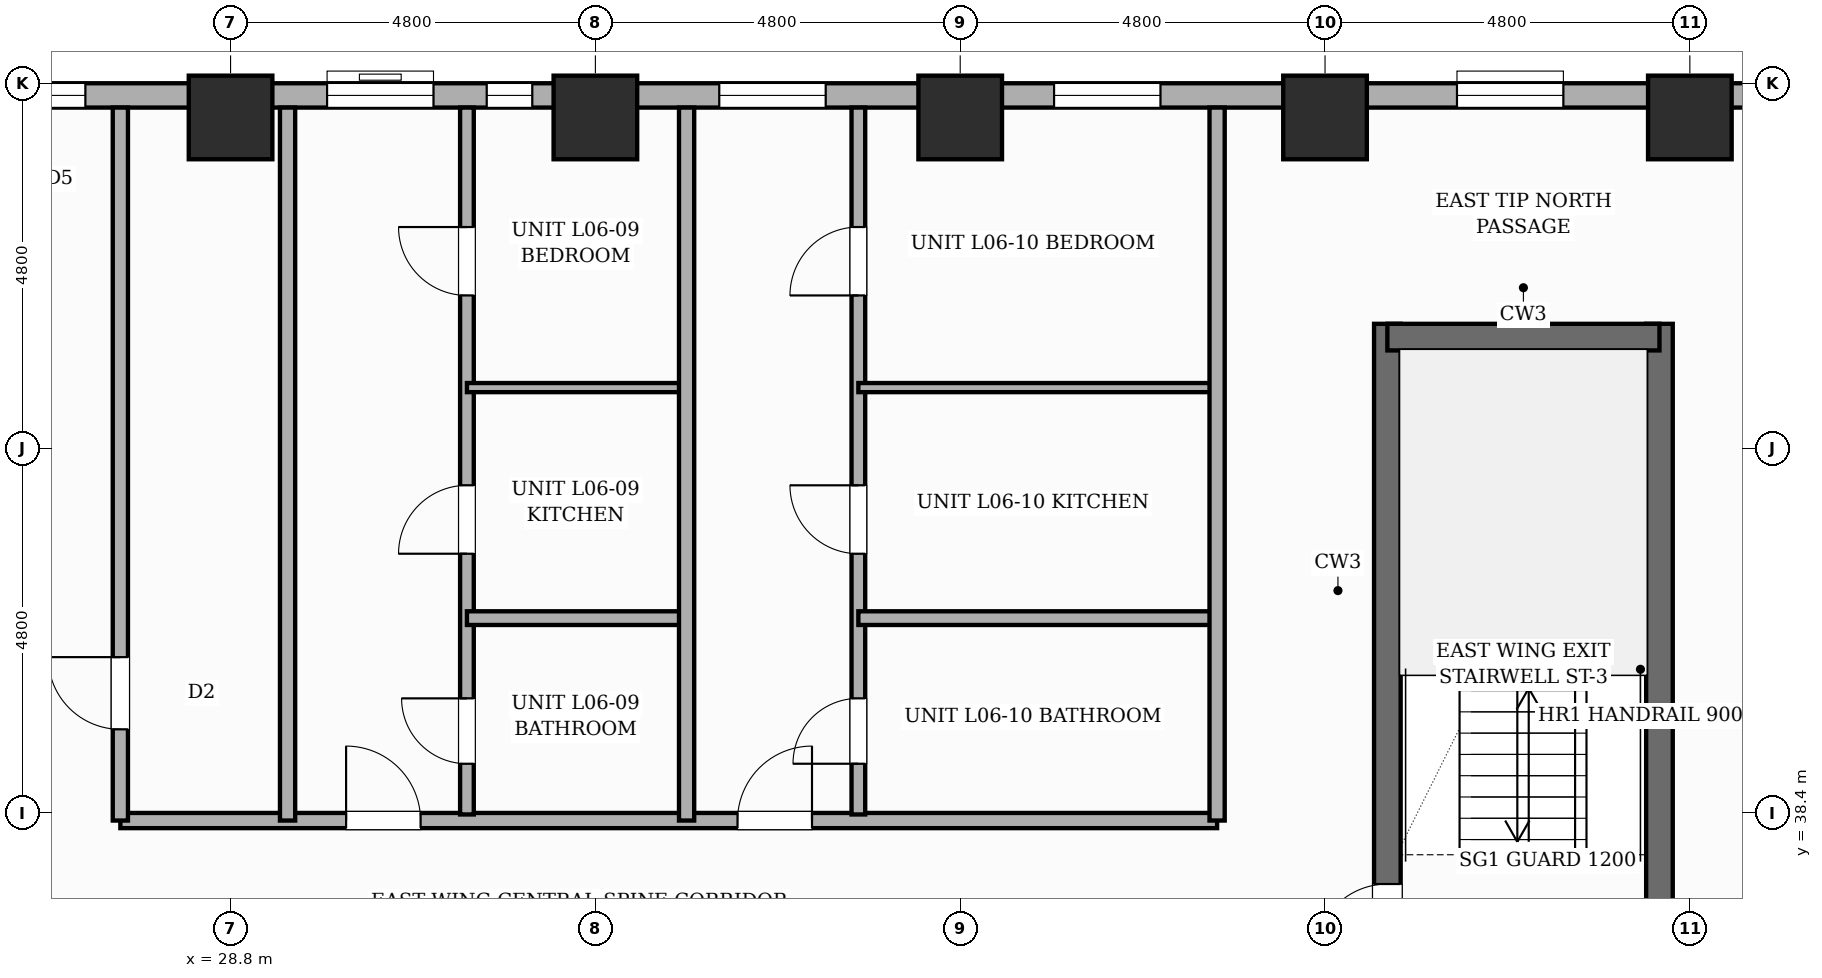
"""IFC4 building model, lengths in metres.
Left out: names, types, materials, properties, quantities, classifications, styles, units other than length and angle.
Written with IfcOpenShell. Run it as: python <this file> out.ifc"""

import sys

from ifc_helpers import new_model, si_unit, direction, frame, frame_2d, origin, origin_2d, place, context, subcontext, project, spatial, rectangle, extrude, element, fill, save


model = new_model("IFC4")
c1 = context("Model", 3, precision=1e-05, world=origin(), true_north=direction((0.0, 1.0)))
c2 = subcontext(c1, "Body", "Model", "MODEL_VIEW")
j1 = project(units=[si_unit("LENGTHUNIT", "METRE"), si_unit("PLANEANGLEUNIT", "RADIAN")], contexts=[c1])
p1 = place(None, origin())
s1 = spatial("IfcSite", under=j1, at=p1, CompositionType="ELEMENT")
p2 = place(p1, origin())
s2 = spatial("IfcBuilding", under=s1, at=p2, CompositionType="ELEMENT")
p3 = place(p2, frame((0.0, 0.0, 28.6)))
s3 = spatial("IfcBuildingStorey", under=s2, at=p3, CompositionType="ELEMENT", Elevation=28.6)
p4 = place(p3, frame((44.02, 35.865, 0.0), z_axis=(0.0, 0.0, 1.0), x_axis=(0.0, 1.0, 0.0)))
e1 = element("IfcWall", 1, at=p4, inside=s3, PredefinedType="SHEAR", context=c2, shape_type="SweptSolid", body=[
    extrude(rectangle(XDim=8.97, YDim=0.35, at=frame_2d((4.485, 0.0))), origin(), (0.0, 0.0, 1.0), 3.6),
])
p5 = place(p4, frame((0.65, 0.0, 0.0)))
e2 = element("IfcOpeningElement", 2, at=p5, cuts=e1, PredefinedType="OPENING", context=c2, shape_type="SweptSolid", body=[
    extrude(rectangle(XDim=0.95, YDim=2.1, at=frame_2d((0.475, 1.05))), frame((0.0, 0.185, 0.0), z_axis=(0.0, -1.0, 0.0), x_axis=(1.0, 0.0, 0.0)), (0.0, 0.0, 1.0), 0.37),
])
p6 = place(p3, frame((47.6, 35.865, 0.0), z_axis=(0.0, 0.0, 1.0), x_axis=(0.0, 1.0, 0.0)))
e3 = element("IfcWall", 3, at=p6, inside=s3, PredefinedType="SHEAR", context=c2, shape_type="SweptSolid", body=[
    extrude(rectangle(XDim=8.97, YDim=0.35, at=frame_2d((4.485, 0.0))), origin(), (0.0, 0.0, 1.0), 3.6),
])
p7 = place(p3, frame((44.02, 44.66, 0.0), z_axis=(0.0, 0.0, 1.0), x_axis=(1.0, 0.0, 0.0)))
e4 = element("IfcWall", 4, at=p7, inside=s3, PredefinedType="SHEAR", context=c2, shape_type="SweptSolid", body=[
    extrude(rectangle(XDim=3.58, YDim=0.35, at=frame_2d((1.79, 0.0))), origin(), (0.0, 0.0, 1.0), 3.6),
])
for number, where, z_axis, x_axis in (
    (5, (28.8, 47.55, 0.0), (0.0, 0.0, 1.0), (1.0, 0.0, 0.0)),
    (6, (33.6, 47.55, 0.0), (0.0, 0.0, 1.0), (1.0, 0.0, 0.0)),
    (7, (38.4, 47.55, 0.0), (0.0, 0.0, 1.0), (1.0, 0.0, 0.0)),
    (8, (43.2, 47.55, 0.0), (0.0, 0.0, 1.0), (1.0, 0.0, 0.0)),
    (9, (48.0, 47.55, 0.0), (0.0, 0.0, 1.0), (1.0, 0.0, 0.0)),
):
    element("IfcColumn", number, at=place(p3, frame(where, z_axis=z_axis, x_axis=x_axis)), inside=s3, PredefinedType="COLUMN", context=c2, shape_type="SweptSolid", body=[
        extrude(rectangle(XDim=1.1, YDim=1.1, at=origin_2d()), origin(), (0.0, 0.0, 1.0), 3.6),
    ])
p8 = place(p3, frame((7.2, 47.84, 0.0), z_axis=(0.0, 0.0, 1.0), x_axis=(1.0, 0.0, 0.0)))
e10 = element("IfcWall", 10, at=p8, inside=s3, PredefinedType="STANDARD", context=c2, shape_type="SweptSolid", body=[
    extrude(rectangle(XDim=48.0, YDim=0.32, at=frame_2d((24.0, 0.0))), origin(), (0.0, 0.0, 1.0), 2.53),
])
p9 = place(p8, frame((24.97, 0.0, 0.45)))
e11 = element("IfcOpeningElement", 11, at=p9, cuts=e10, PredefinedType="OPENING", context=c2, shape_type="SweptSolid", body=[
    extrude(rectangle(XDim=0.6, YDim=1.8, at=frame_2d((0.3, 0.9))), frame((0.0, 0.17, 0.0), z_axis=(0.0, -1.0, 0.0), x_axis=(1.0, 0.0, 0.0)), (0.0, 0.0, 1.0), 0.34),
])
p10 = place(p8, frame((32.435, 0.0, 0.65)))
e12 = element("IfcOpeningElement", 12, at=p10, cuts=e10, PredefinedType="OPENING", context=c2, shape_type="SweptSolid", body=[
    extrude(rectangle(XDim=1.4, YDim=1.1, at=frame_2d((0.7, 0.55))), frame((0.0, 0.17, 0.0), z_axis=(0.0, -1.0, 0.0), x_axis=(1.0, 0.0, 0.0)), (0.0, 0.0, 1.0), 0.34),
])
p11 = place(p8, frame((47.094, 0.0, 0.45)))
e13 = element("IfcOpeningElement", 13, at=p11, cuts=e10, PredefinedType="OPENING", context=c2, shape_type="SweptSolid", body=[
    extrude(rectangle(XDim=0.6, YDim=1.8, at=frame_2d((0.3, 0.9))), frame((0.0, 0.17, 0.0), z_axis=(0.0, -1.0, 0.0), x_axis=(1.0, 0.0, 0.0)), (0.0, 0.0, 1.0), 0.34),
])
p12 = place(p8, frame((18.74, 0.0, 0.45)))
e14 = element("IfcOpeningElement", 14, at=p12, cuts=e10, PredefinedType="OPENING", context=c2, shape_type="SweptSolid", body=[
    extrude(rectangle(XDim=0.95, YDim=1.8, at=frame_2d((0.475, 0.9))), frame((0.0, 0.17, 0.0), z_axis=(0.0, -1.0, 0.0), x_axis=(1.0, 0.0, 0.0)), (0.0, 0.0, 1.0), 0.34),
])
p13 = place(p8, frame((41.65, 0.0, 0.45)))
e15 = element("IfcOpeningElement", 15, at=p13, cuts=e10, PredefinedType="OPENING", context=c2, shape_type="SweptSolid", body=[
    extrude(rectangle(XDim=0.75, YDim=1.8, at=frame_2d((0.375, 0.9))), frame((0.0, 0.17, 0.0), z_axis=(0.0, -1.0, 0.0), x_axis=(1.0, 0.0, 0.0)), (0.0, 0.0, 1.0), 0.34),
])
p14 = place(p8, frame((37.736, 0.0, 0.65)))
e16 = element("IfcOpeningElement", 16, at=p14, cuts=e10, PredefinedType="OPENING", context=c2, shape_type="SweptSolid", body=[
    extrude(rectangle(XDim=1.4, YDim=1.1, at=frame_2d((0.7, 0.55))), frame((0.0, 0.17, 0.0), z_axis=(0.0, -1.0, 0.0), x_axis=(1.0, 0.0, 0.0)), (0.0, 0.0, 1.0), 0.34),
])
p15 = place(p8, frame((0.47, 0.0, 0.45)))
e17 = element("IfcOpeningElement", 17, at=p15, cuts=e10, PredefinedType="OPENING", context=c2, shape_type="SweptSolid", body=[
    extrude(rectangle(XDim=0.95, YDim=1.8, at=frame_2d((0.475, 0.9))), frame((0.0, 0.17, 0.0), z_axis=(0.0, -1.0, 0.0), x_axis=(1.0, 0.0, 0.0)), (0.0, 0.0, 1.0), 0.34),
])
p16 = place(p8, frame((4.815, 0.0, 0.65)))
e18 = element("IfcOpeningElement", 18, at=p16, cuts=e10, PredefinedType="OPENING", context=c2, shape_type="SweptSolid", body=[
    extrude(rectangle(XDim=1.4, YDim=1.1, at=frame_2d((0.7, 0.55))), frame((0.0, 0.17, 0.0), z_axis=(0.0, -1.0, 0.0), x_axis=(1.0, 0.0, 0.0)), (0.0, 0.0, 1.0), 0.34),
])
p17 = place(p8, frame((22.87, 0.0, 0.65)))
e19 = element("IfcOpeningElement", 19, at=p17, cuts=e10, PredefinedType="OPENING", context=c2, shape_type="SweptSolid", body=[
    extrude(rectangle(XDim=1.4, YDim=1.1, at=frame_2d((0.7, 0.55))), frame((0.0, 0.17, 0.0), z_axis=(0.0, -1.0, 0.0), x_axis=(1.0, 0.0, 0.0)), (0.0, 0.0, 1.0), 0.34),
])
p18 = place(p8, frame((28.03, 0.0, 0.65)))
e20 = element("IfcOpeningElement", 20, at=p18, cuts=e10, PredefinedType="OPENING", context=c2, shape_type="SweptSolid", body=[
    extrude(rectangle(XDim=1.4, YDim=1.1, at=frame_2d((0.7, 0.55))), frame((0.0, 0.17, 0.0), z_axis=(0.0, -1.0, 0.0), x_axis=(1.0, 0.0, 0.0)), (0.0, 0.0, 1.0), 0.34),
])
p19 = place(p8, frame((42.95, 0.0, 0.65)))
e21 = element("IfcOpeningElement", 21, at=p19, cuts=e10, PredefinedType="OPENING", context=c2, shape_type="SweptSolid", body=[
    extrude(rectangle(XDim=1.4, YDim=1.1, at=frame_2d((0.7, 0.55))), frame((0.0, 0.17, 0.0), z_axis=(0.0, -1.0, 0.0), x_axis=(1.0, 0.0, 0.0)), (0.0, 0.0, 1.0), 0.34),
])
p20 = place(p8, frame((45.984, 0.0, 0.45)))
e22 = element("IfcOpeningElement", 22, at=p20, cuts=e10, PredefinedType="OPENING", context=c2, shape_type="SweptSolid", body=[
    extrude(rectangle(XDim=0.6, YDim=1.8, at=frame_2d((0.3, 0.9))), frame((0.0, 0.17, 0.0), z_axis=(0.0, -1.0, 0.0), x_axis=(1.0, 0.0, 0.0)), (0.0, 0.0, 1.0), 0.34),
])
p21 = place(p3, frame((27.35, 38.3, 0.0), z_axis=(0.0, 0.0, 1.0), x_axis=(1.0, 0.0, 0.0)))
e23 = element("IfcWall", 23, at=p21, inside=s3, PredefinedType="PARTITIONING", context=c2, shape_type="SweptSolid", body=[
    extrude(rectangle(XDim=14.43, YDim=0.2, at=frame_2d((7.215, 0.0))), origin(), (0.0, 0.0, 1.0), 3.35),
])
p22 = place(p21, frame((2.97, 0.0, 0.0)))
e24 = element("IfcOpeningElement", 24, at=p22, cuts=e23, PredefinedType="OPENING", context=c2, shape_type="SweptSolid", body=[
    extrude(rectangle(XDim=0.98, YDim=2.18, at=frame_2d((0.49, 1.09))), frame((0.0, 0.11, 0.0), z_axis=(0.0, -1.0, 0.0), x_axis=(1.0, 0.0, 0.0)), (0.0, 0.0, 1.0), 0.22),
])
p23 = place(p21, frame((8.12, 0.0, 0.0)))
e25 = element("IfcOpeningElement", 25, at=p23, cuts=e23, PredefinedType="OPENING", context=c2, shape_type="SweptSolid", body=[
    extrude(rectangle(XDim=0.98, YDim=2.18, at=frame_2d((0.49, 1.09))), frame((0.0, 0.11, 0.0), z_axis=(0.0, -1.0, 0.0), x_axis=(1.0, 0.0, 0.0)), (0.0, 0.0, 1.0), 0.22),
])
p24 = place(p3, frame((27.35, 38.3, 0.0), z_axis=(0.0, 0.0, 1.0), x_axis=(0.0, 1.0, 0.0)))
e26 = element("IfcWall", 26, at=p24, inside=s3, PredefinedType="PARTITIONING", context=c2, shape_type="SweptSolid", body=[
    extrude(rectangle(XDim=9.38, YDim=0.2, at=frame_2d((4.69, 0.0))), origin(), (0.0, 0.0, 1.0), 3.35),
])
p25 = place(p24, frame((1.2, 0.0, 0.0)))
e27 = element("IfcOpeningElement", 27, at=p25, cuts=e26, PredefinedType="OPENING", context=c2, shape_type="SweptSolid", body=[
    extrude(rectangle(XDim=0.95, YDim=2.15, at=frame_2d((0.475, 1.075))), frame((0.0, 0.11, 0.0), z_axis=(0.0, -1.0, 0.0), x_axis=(1.0, 0.0, 0.0)), (0.0, 0.0, 1.0), 0.22),
])
p26 = place(p3, frame((29.55, 38.3, 0.0), z_axis=(0.0, 0.0, 1.0), x_axis=(0.0, 1.0, 0.0)))
e28 = element("IfcWall", 28, at=p26, inside=s3, PredefinedType="SOLIDWALL", context=c2, shape_type="SweptSolid", body=[
    extrude(rectangle(XDim=9.38, YDim=0.2, at=frame_2d((4.69, 0.0))), origin(), (0.0, 0.0, 1.0), 3.35),
])
p27 = place(p3, frame((31.91, 38.38, 0.0), z_axis=(0.0, 0.0, 1.0), x_axis=(0.0, 1.0, 0.0)))
e29 = element("IfcWall", 29, at=p27, inside=s3, PredefinedType="PLUMBINGWALL", context=c2, shape_type="SweptSolid", body=[
    extrude(rectangle(XDim=9.3, YDim=0.18, at=frame_2d((4.65, 0.0))), origin(), (0.0, 0.0, 1.0), 3.35),
])
p28 = place(p27, frame((0.667, 0.0, 0.0)))
e30 = element("IfcOpeningElement", 30, at=p28, cuts=e29, PredefinedType="OPENING", context=c2, shape_type="SweptSolid", body=[
    extrude(rectangle(XDim=0.86, YDim=2.1, at=frame_2d((0.43, 1.05))), frame((0.0, 0.1, 0.0), z_axis=(0.0, -1.0, 0.0), x_axis=(1.0, 0.0, 0.0)), (0.0, 0.0, 1.0), 0.2),
])
p29 = place(p27, frame((3.43, 0.0, 0.0)))
e31 = element("IfcOpeningElement", 31, at=p29, cuts=e29, PredefinedType="OPENING", context=c2, shape_type="SweptSolid", body=[
    extrude(rectangle(XDim=0.9, YDim=2.15, at=frame_2d((0.45, 1.075))), frame((0.0, 0.1, 0.0), z_axis=(0.0, -1.0, 0.0), x_axis=(1.0, 0.0, 0.0)), (0.0, 0.0, 1.0), 0.2),
])
p30 = place(p27, frame((6.828, 0.0, 0.0)))
e32 = element("IfcOpeningElement", 32, at=p30, cuts=e29, PredefinedType="OPENING", context=c2, shape_type="SweptSolid", body=[
    extrude(rectangle(XDim=0.9, YDim=2.15, at=frame_2d((0.45, 1.075))), frame((0.0, 0.1, 0.0), z_axis=(0.0, -1.0, 0.0), x_axis=(1.0, 0.0, 0.0)), (0.0, 0.0, 1.0), 0.2),
])
p31 = place(p3, frame((31.91, 40.963, 0.0), z_axis=(0.0, 0.0, 1.0), x_axis=(1.0, 0.0, 0.0)))
e33 = element("IfcWall", 33, at=p31, inside=s3, PredefinedType="PLUMBINGWALL", context=c2, shape_type="SweptSolid", body=[
    extrude(rectangle(XDim=2.91, YDim=0.18, at=frame_2d((1.455, 0.0))), origin(), (0.0, 0.0, 1.0), 3.35),
])
p32 = place(p3, frame((31.91, 43.996, 0.0), z_axis=(0.0, 0.0, 1.0), x_axis=(1.0, 0.0, 0.0)))
e34 = element("IfcWall", 34, at=p32, inside=s3, PredefinedType="PARTITIONING", context=c2, shape_type="SweptSolid", body=[
    extrude(rectangle(XDim=2.91, YDim=0.12, at=frame_2d((1.455, 0.0))), origin(), (0.0, 0.0, 1.0), 3.35),
])
p33 = place(p3, frame((34.8, 38.3, 0.0), z_axis=(0.0, 0.0, 1.0), x_axis=(0.0, 1.0, 0.0)))
e35 = element("IfcWall", 35, at=p33, inside=s3, PredefinedType="SOLIDWALL", context=c2, shape_type="SweptSolid", body=[
    extrude(rectangle(XDim=9.38, YDim=0.2, at=frame_2d((4.69, 0.0))), origin(), (0.0, 0.0, 1.0), 3.35),
])
p34 = place(p3, frame((37.06, 38.38, 0.0), z_axis=(0.0, 0.0, 1.0), x_axis=(0.0, 1.0, 0.0)))
e36 = element("IfcWall", 36, at=p34, inside=s3, PredefinedType="PLUMBINGWALL", context=c2, shape_type="SweptSolid", body=[
    extrude(rectangle(XDim=9.3, YDim=0.18, at=frame_2d((4.65, 0.0))), origin(), (0.0, 0.0, 1.0), 3.35),
])
p35 = place(p34, frame((0.667, 0.0, 0.0)))
e37 = element("IfcOpeningElement", 37, at=p35, cuts=e36, PredefinedType="OPENING", context=c2, shape_type="SweptSolid", body=[
    extrude(rectangle(XDim=0.86, YDim=2.1, at=frame_2d((0.43, 1.05))), frame((0.0, 0.1, 0.0), z_axis=(0.0, -1.0, 0.0), x_axis=(1.0, 0.0, 0.0)), (0.0, 0.0, 1.0), 0.2),
])
p36 = place(p34, frame((3.43, 0.0, 0.0)))
e38 = element("IfcOpeningElement", 38, at=p36, cuts=e36, PredefinedType="OPENING", context=c2, shape_type="SweptSolid", body=[
    extrude(rectangle(XDim=0.9, YDim=2.15, at=frame_2d((0.45, 1.075))), frame((0.0, 0.1, 0.0), z_axis=(0.0, -1.0, 0.0), x_axis=(1.0, 0.0, 0.0)), (0.0, 0.0, 1.0), 0.2),
])
p37 = place(p34, frame((6.828, 0.0, 0.0)))
e39 = element("IfcOpeningElement", 39, at=p37, cuts=e36, PredefinedType="OPENING", context=c2, shape_type="SweptSolid", body=[
    extrude(rectangle(XDim=0.9, YDim=2.15, at=frame_2d((0.45, 1.075))), frame((0.0, 0.1, 0.0), z_axis=(0.0, -1.0, 0.0), x_axis=(1.0, 0.0, 0.0)), (0.0, 0.0, 1.0), 0.2),
])
p38 = place(p3, frame((37.06, 40.963, 0.0), z_axis=(0.0, 0.0, 1.0), x_axis=(1.0, 0.0, 0.0)))
e40 = element("IfcWall", 40, at=p38, inside=s3, PredefinedType="PLUMBINGWALL", context=c2, shape_type="SweptSolid", body=[
    extrude(rectangle(XDim=4.64, YDim=0.18, at=frame_2d((2.32, 0.0))), origin(), (0.0, 0.0, 1.0), 3.35),
])
p39 = place(p3, frame((37.06, 43.996, 0.0), z_axis=(0.0, 0.0, 1.0), x_axis=(1.0, 0.0, 0.0)))
e41 = element("IfcWall", 41, at=p39, inside=s3, PredefinedType="PARTITIONING", context=c2, shape_type="SweptSolid", body=[
    extrude(rectangle(XDim=4.64, YDim=0.12, at=frame_2d((2.32, 0.0))), origin(), (0.0, 0.0, 1.0), 3.35),
])
p40 = place(p3, frame((41.78, 38.3, 0.0), z_axis=(0.0, 0.0, 1.0), x_axis=(0.0, 1.0, 0.0)))
e42 = element("IfcWall", 42, at=p40, inside=s3, PredefinedType="PARTITIONING", context=c2, shape_type="SweptSolid", body=[
    extrude(rectangle(XDim=9.38, YDim=0.2, at=frame_2d((4.69, 0.0))), origin(), (0.0, 0.0, 1.0), 3.35),
])
p41 = place(p9, origin())
e43 = element("IfcWindow", 43, at=p41, inside=s3, PartitioningType="SINGLE_PANEL", PredefinedType="WINDOW", context=c2, shape_type="SweptSolid", body=[
    extrude(rectangle(XDim=0.6, YDim=1.8, at=frame_2d((0.3, 0.9))), frame((0.0, 0.03, 0.0), z_axis=(0.0, -1.0, 0.0), x_axis=(1.0, 0.0, 0.0)), (0.0, 0.0, 1.0), 0.06),
])
fill(e11, e43)
p42 = place(p10, origin())
e44 = element("IfcWindow", 44, at=p42, inside=s3, PartitioningType="SINGLE_PANEL", PredefinedType="WINDOW", context=c2, shape_type="SweptSolid", body=[
    extrude(rectangle(XDim=1.4, YDim=1.1, at=frame_2d((0.7, 0.55))), frame((0.0, 0.03, 0.0), z_axis=(0.0, -1.0, 0.0), x_axis=(1.0, 0.0, 0.0)), (0.0, 0.0, 1.0), 0.06),
])
fill(e12, e44)
p43 = place(p12, origin())
e45 = element("IfcWindow", 45, at=p43, inside=s3, PartitioningType="SINGLE_PANEL", PredefinedType="WINDOW", context=c2, shape_type="SweptSolid", body=[
    extrude(rectangle(XDim=0.95, YDim=1.8, at=frame_2d((0.475, 0.9))), frame((0.0, 0.03, 0.0), z_axis=(0.0, -1.0, 0.0), x_axis=(1.0, 0.0, 0.0)), (0.0, 0.0, 1.0), 0.06),
])
fill(e14, e45)
p44 = place(p14, origin())
e46 = element("IfcWindow", 46, at=p44, inside=s3, PartitioningType="SINGLE_PANEL", PredefinedType="WINDOW", context=c2, shape_type="SweptSolid", body=[
    extrude(rectangle(XDim=1.4, YDim=1.1, at=frame_2d((0.7, 0.55))), frame((0.0, 0.03, 0.0), z_axis=(0.0, -1.0, 0.0), x_axis=(1.0, 0.0, 0.0)), (0.0, 0.0, 1.0), 0.06),
])
fill(e16, e46)
p45 = place(p17, origin())
e47 = element("IfcWindow", 47, at=p45, inside=s3, PartitioningType="SINGLE_PANEL", PredefinedType="WINDOW", context=c2, shape_type="SweptSolid", body=[
    extrude(rectangle(XDim=1.4, YDim=1.1, at=frame_2d((0.7, 0.55))), frame((0.0, 0.03, 0.0), z_axis=(0.0, -1.0, 0.0), x_axis=(1.0, 0.0, 0.0)), (0.0, 0.0, 1.0), 0.06),
])
fill(e19, e47)
p46 = place(p18, origin())
e48 = element("IfcWindow", 48, at=p46, inside=s3, PartitioningType="SINGLE_PANEL", PredefinedType="WINDOW", context=c2, shape_type="SweptSolid", body=[
    extrude(rectangle(XDim=1.4, YDim=1.1, at=frame_2d((0.7, 0.55))), frame((0.0, 0.03, 0.0), z_axis=(0.0, -1.0, 0.0), x_axis=(1.0, 0.0, 0.0)), (0.0, 0.0, 1.0), 0.06),
])
fill(e20, e48)
p47 = place(p5, origin())
e49 = element("IfcDoor", 49, at=p47, inside=s3, OperationType="SINGLE_SWING_LEFT", PredefinedType="DOOR", context=c2, shape_type="SweptSolid", body=[
    extrude(rectangle(XDim=0.95, YDim=2.1, at=frame_2d((0.475, 1.05))), frame((0.0, 0.025, 0.0), z_axis=(0.0, -1.0, 0.0), x_axis=(1.0, 0.0, 0.0)), (0.0, 0.0, 1.0), 0.05),
])
fill(e2, e49)
p48 = place(p25, origin())
e50 = element("IfcDoor", 50, at=p48, inside=s3, OperationType="SINGLE_SWING_RIGHT", PredefinedType="DOOR", context=c2, shape_type="SweptSolid", body=[
    extrude(rectangle(XDim=0.95, YDim=2.15, at=frame_2d((0.475, 1.075))), frame((0.0, 0.025, 0.0), z_axis=(0.0, -1.0, 0.0), x_axis=(1.0, 0.0, 0.0)), (0.0, 0.0, 1.0), 0.05),
])
fill(e27, e50)
p49 = place(p22, origin())
e51 = element("IfcDoor", 51, at=p49, inside=s3, OperationType="SINGLE_SWING_LEFT", PredefinedType="DOOR", context=c2, shape_type="SweptSolid", body=[
    extrude(rectangle(XDim=0.98, YDim=2.18, at=frame_2d((0.49, 1.09))), frame((0.0, 0.025, 0.0), z_axis=(0.0, -1.0, 0.0), x_axis=(1.0, 0.0, 0.0)), (0.0, 0.0, 1.0), 0.05),
])
fill(e24, e51)
p50 = place(p28, origin())
e52 = element("IfcDoor", 52, at=p50, inside=s3, OperationType="SINGLE_SWING_RIGHT", PredefinedType="DOOR", context=c2, shape_type="SweptSolid", body=[
    extrude(rectangle(XDim=0.86, YDim=2.1, at=frame_2d((0.43, 1.05))), frame((0.0, 0.025, 0.0), z_axis=(0.0, -1.0, 0.0), x_axis=(1.0, 0.0, 0.0)), (0.0, 0.0, 1.0), 0.05),
])
fill(e30, e52)
p51 = place(p29, origin())
e53 = element("IfcDoor", 53, at=p51, inside=s3, OperationType="SINGLE_SWING_LEFT", PredefinedType="DOOR", context=c2, shape_type="SweptSolid", body=[
    extrude(rectangle(XDim=0.9, YDim=2.15, at=frame_2d((0.45, 1.075))), frame((0.0, 0.025, 0.0), z_axis=(0.0, -1.0, 0.0), x_axis=(1.0, 0.0, 0.0)), (0.0, 0.0, 1.0), 0.05),
])
fill(e31, e53)
p52 = place(p30, origin())
e54 = element("IfcDoor", 54, at=p52, inside=s3, OperationType="SINGLE_SWING_RIGHT", PredefinedType="DOOR", context=c2, shape_type="SweptSolid", body=[
    extrude(rectangle(XDim=0.9, YDim=2.15, at=frame_2d((0.45, 1.075))), frame((0.0, 0.025, 0.0), z_axis=(0.0, -1.0, 0.0), x_axis=(1.0, 0.0, 0.0)), (0.0, 0.0, 1.0), 0.05),
])
fill(e32, e54)
p53 = place(p23, origin())
e55 = element("IfcDoor", 55, at=p53, inside=s3, OperationType="SINGLE_SWING_RIGHT", PredefinedType="DOOR", context=c2, shape_type="SweptSolid", body=[
    extrude(rectangle(XDim=0.98, YDim=2.18, at=frame_2d((0.49, 1.09))), frame((0.0, 0.025, 0.0), z_axis=(0.0, -1.0, 0.0), x_axis=(1.0, 0.0, 0.0)), (0.0, 0.0, 1.0), 0.05),
])
fill(e25, e55)
p54 = place(p35, origin())
e56 = element("IfcDoor", 56, at=p54, inside=s3, OperationType="SINGLE_SWING_LEFT", PredefinedType="DOOR", context=c2, shape_type="SweptSolid", body=[
    extrude(rectangle(XDim=0.86, YDim=2.1, at=frame_2d((0.43, 1.05))), frame((0.0, 0.025, 0.0), z_axis=(0.0, -1.0, 0.0), x_axis=(1.0, 0.0, 0.0)), (0.0, 0.0, 1.0), 0.05),
])
fill(e37, e56)
p55 = place(p36, origin())
e57 = element("IfcDoor", 57, at=p55, inside=s3, OperationType="SINGLE_SWING_RIGHT", PredefinedType="DOOR", context=c2, shape_type="SweptSolid", body=[
    extrude(rectangle(XDim=0.9, YDim=2.15, at=frame_2d((0.45, 1.075))), frame((0.0, 0.025, 0.0), z_axis=(0.0, -1.0, 0.0), x_axis=(1.0, 0.0, 0.0)), (0.0, 0.0, 1.0), 0.05),
])
fill(e38, e57)
p56 = place(p37, origin())
e58 = element("IfcDoor", 58, at=p56, inside=s3, OperationType="SINGLE_SWING_LEFT", PredefinedType="DOOR", context=c2, shape_type="SweptSolid", body=[
    extrude(rectangle(XDim=0.9, YDim=2.15, at=frame_2d((0.45, 1.075))), frame((0.0, 0.025, 0.0), z_axis=(0.0, -1.0, 0.0), x_axis=(1.0, 0.0, 0.0)), (0.0, 0.0, 1.0), 0.05),
])
fill(e39, e58)
save(model, sys.argv[1])
